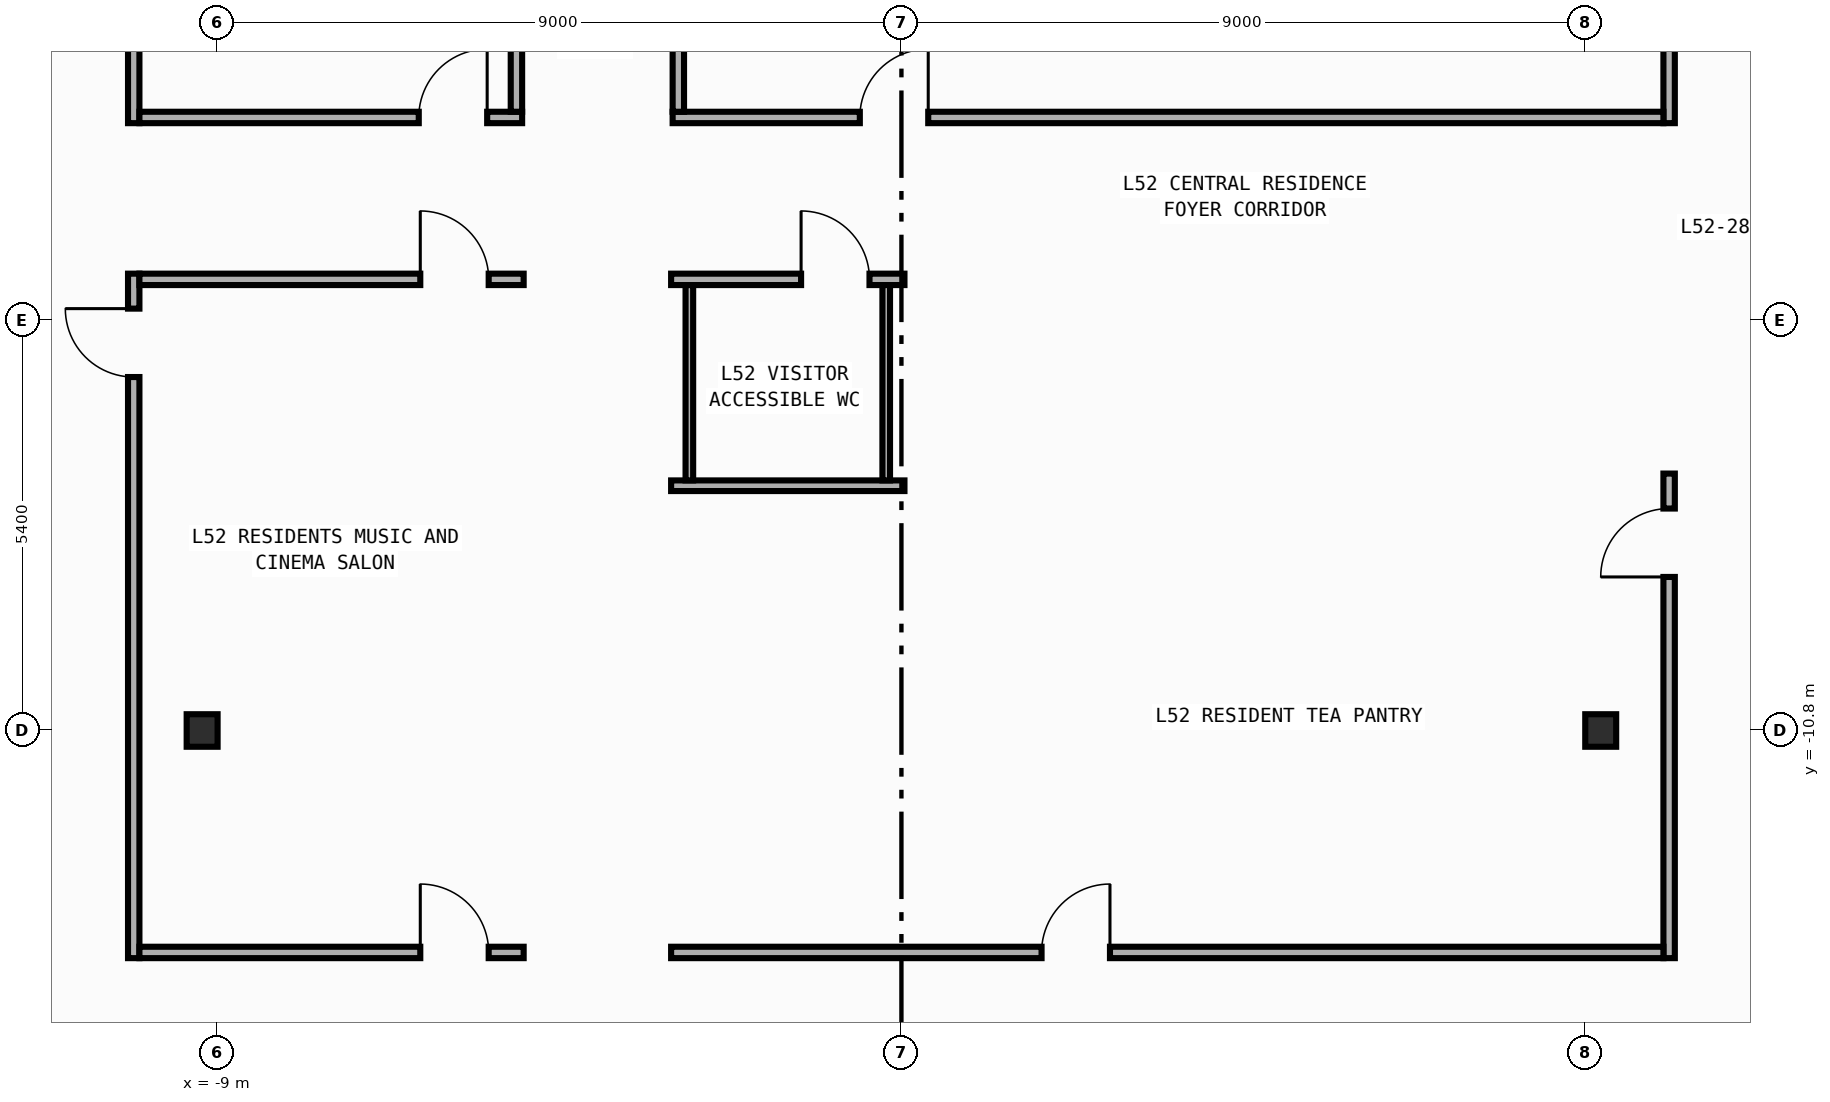
"""IFC4 building model, lengths in metres.
Left out: names, types, materials, properties, quantities, classifications, styles, units other than length and angle.
Written with IfcOpenShell. Run it as: python <this file> out.ifc"""

import sys

from ifc_helpers import new_model, si_unit, direction, frame, frame_2d, origin, origin_2d, place, context, subcontext, project, spatial, rectangle, i_section, extrude, element, fill, save


model = new_model("IFC4")
c1 = context("Model", 3, precision=1e-05, world=origin(), true_north=direction((0.0, 1.0)))
c2 = subcontext(c1, "Body", "Model", "MODEL_VIEW")
j1 = project(units=[si_unit("LENGTHUNIT", "METRE"), si_unit("PLANEANGLEUNIT", "RADIAN")], contexts=[c1])
p1 = place(None, origin())
s1 = spatial("IfcSite", under=j1, at=p1, CompositionType="ELEMENT")
p2 = place(p1, origin())
s2 = spatial("IfcBuilding", under=s1, at=p2, CompositionType="ELEMENT")
p3 = place(p2, frame((0.0, 0.0, 226.0)))
s3 = spatial("IfcBuildingStorey", under=s2, at=p3, CompositionType="ELEMENT", Elevation=226.0)
for number, where, z_axis, x_axis in (
    (1, (-9.2, -10.8, 0.0), (0.0, 0.0, 1.0), (1.0, 0.0, 0.0)),
    (2, (9.2, -10.8, 0.0), (0.0, 0.0, 1.0), (1.0, 0.0, 0.0)),
):
    element("IfcColumn", number, at=place(p3, frame(where, z_axis=z_axis, x_axis=x_axis)), inside=s3, PredefinedType="COLUMN", context=c2, shape_type="SweptSolid", body=[
        extrude(i_section(OverallWidth=0.407, OverallDepth=0.428, WebThickness=0.02, FlangeThickness=0.035, FilletRadius=0.022, at=origin_2d()), origin(), (0.0, 0.0, 1.0), 3.6),
    ])
p4 = place(p3, frame((-10.1, -2.81, 0.0), z_axis=(0.0, 0.0, 1.0), x_axis=(0.0, 1.0, 0.0)))
e3 = element("IfcWall", 3, at=p4, inside=s3, PredefinedType="PARTITIONING", context=c2, shape_type="SweptSolid", body=[
    extrude(rectangle(XDim=16.605, YDim=0.15, at=frame_2d((8.302, 0.0))), origin(), (0.0, 0.0, 1.0), 3.34),
])
p5 = place(p4, frame((7.751, 0.0, 0.0)))
e4 = element("IfcOpeningElement", 4, at=p5, cuts=e3, PredefinedType="OPENING", context=c2, shape_type="SweptSolid", body=[
    extrude(rectangle(XDim=0.9, YDim=2.15, at=frame_2d((0.45, 1.075))), frame((0.0, 0.085, 0.0), z_axis=(0.0, -1.0, 0.0), x_axis=(1.0, 0.0, 0.0)), (0.0, 0.0, 1.0), 0.17),
])
p6 = place(p3, frame((-10.1, -13.795, 0.0), z_axis=(0.0, 0.0, 1.0), x_axis=(0.0, 1.0, 0.0)))
e5 = element("IfcWall", 5, at=p6, inside=s3, PredefinedType="PARTITIONING", context=c2, shape_type="SweptSolid", body=[
    extrude(rectangle(XDim=9.005, YDim=0.15, at=frame_2d((4.502, 0.0))), origin(), (0.0, 0.0, 1.0), 3.34),
])
p7 = place(p6, frame((7.645, 0.0, 0.0)))
e6 = element("IfcOpeningElement", 6, at=p7, cuts=e5, PredefinedType="OPENING", context=c2, shape_type="SweptSolid", body=[
    extrude(rectangle(XDim=0.9, YDim=2.15, at=frame_2d((0.45, 1.075))), frame((0.0, 0.085, 0.0), z_axis=(0.0, -1.0, 0.0), x_axis=(1.0, 0.0, 0.0)), (0.0, 0.0, 1.0), 0.17),
])
p8 = place(p3, frame((10.1, -2.81, 0.0), z_axis=(0.0, 0.0, 1.0), x_axis=(0.0, 1.0, 0.0)))
e7 = element("IfcWall", 7, at=p8, inside=s3, PredefinedType="PARTITIONING", context=c2, shape_type="SweptSolid", body=[
    extrude(rectangle(XDim=16.605, YDim=0.15, at=frame_2d((8.302, 0.0))), origin(), (0.0, 0.0, 1.0), 3.34),
])
p9 = place(p8, frame((7.751, 0.0, 0.0)))
e8 = element("IfcOpeningElement", 8, at=p9, cuts=e7, PredefinedType="OPENING", context=c2, shape_type="SweptSolid", body=[
    extrude(rectangle(XDim=0.9, YDim=2.15, at=frame_2d((0.45, 1.075))), frame((0.0, 0.085, 0.0), z_axis=(0.0, -1.0, 0.0), x_axis=(1.0, 0.0, 0.0)), (0.0, 0.0, 1.0), 0.17),
])
p10 = place(p3, frame((10.1, -13.795, 0.0), z_axis=(0.0, 0.0, 1.0), x_axis=(0.0, 1.0, 0.0)))
e9 = element("IfcWall", 9, at=p10, inside=s3, PredefinedType="PARTITIONING", context=c2, shape_type="SweptSolid", body=[
    extrude(rectangle(XDim=6.375, YDim=0.15, at=frame_2d((3.188, 0.0))), origin(), (0.0, 0.0, 1.0), 3.34),
])
p11 = place(p10, frame((5.015, 0.0, 0.0)))
e10 = element("IfcOpeningElement", 10, at=p11, cuts=e9, PredefinedType="OPENING", context=c2, shape_type="SweptSolid", body=[
    extrude(rectangle(XDim=0.9, YDim=2.15, at=frame_2d((0.45, 1.075))), frame((0.0, 0.085, 0.0), z_axis=(0.0, -1.0, 0.0), x_axis=(1.0, 0.0, 0.0)), (0.0, 0.0, 1.0), 0.17),
])
p12 = place(p3, frame((-10.025, -2.735, 0.0), z_axis=(0.0, 0.0, 1.0), x_axis=(1.0, 0.0, 0.0)))
e11 = element("IfcWall", 11, at=p12, inside=s3, PredefinedType="PARTITIONING", context=c2, shape_type="SweptSolid", body=[
    extrude(rectangle(XDim=5.035, YDim=0.15, at=frame_2d((2.518, 0.0))), origin(), (0.0, 0.0, 1.0), 3.34),
])
p13 = place(p12, frame((3.675, 0.0, 0.0)))
e12 = element("IfcOpeningElement", 12, at=p13, cuts=e11, PredefinedType="OPENING", context=c2, shape_type="SweptSolid", body=[
    extrude(rectangle(XDim=0.9, YDim=2.15, at=frame_2d((0.45, 1.075))), frame((0.0, 0.085, 0.0), z_axis=(0.0, -1.0, 0.0), x_axis=(1.0, 0.0, 0.0)), (0.0, 0.0, 1.0), 0.17),
])
p14 = place(p3, frame((-10.025, -4.865, 0.0), z_axis=(0.0, 0.0, 1.0), x_axis=(1.0, 0.0, 0.0)))
e13 = element("IfcWall", 13, at=p14, inside=s3, PredefinedType="PARTITIONING", context=c2, shape_type="SweptSolid", body=[
    extrude(rectangle(XDim=5.055, YDim=0.15, at=frame_2d((2.527, 0.0))), origin(), (0.0, 0.0, 1.0), 3.34),
])
p15 = place(p14, frame((3.695, 0.0, 0.0)))
e14 = element("IfcOpeningElement", 14, at=p15, cuts=e13, PredefinedType="OPENING", context=c2, shape_type="SweptSolid", body=[
    extrude(rectangle(XDim=0.9, YDim=2.15, at=frame_2d((0.45, 1.075))), frame((0.0, 0.085, 0.0), z_axis=(0.0, -1.0, 0.0), x_axis=(1.0, 0.0, 0.0)), (0.0, 0.0, 1.0), 0.17),
])
p16 = place(p3, frame((-3.01, -2.735, 0.0), z_axis=(0.0, 0.0, 1.0), x_axis=(1.0, 0.0, 0.0)))
e15 = element("IfcWall", 15, at=p16, inside=s3, PredefinedType="PARTITIONING", context=c2, shape_type="SweptSolid", body=[
    extrude(rectangle(XDim=13.035, YDim=0.15, at=frame_2d((6.518, 0.0))), origin(), (0.0, 0.0, 1.0), 3.34),
])
p17 = place(p16, frame((2.463, 0.0, 0.0)))
e16 = element("IfcOpeningElement", 16, at=p17, cuts=e15, PredefinedType="OPENING", context=c2, shape_type="SweptSolid", body=[
    extrude(rectangle(XDim=0.9, YDim=2.15, at=frame_2d((0.45, 1.075))), frame((0.0, 0.085, 0.0), z_axis=(0.0, -1.0, 0.0), x_axis=(1.0, 0.0, 0.0)), (0.0, 0.0, 1.0), 0.17),
])
p18 = place(p3, frame((-3.03, -4.865, 0.0), z_axis=(0.0, 0.0, 1.0), x_axis=(1.0, 0.0, 0.0)))
e17 = element("IfcWall", 17, at=p18, inside=s3, PredefinedType="PARTITIONING", context=c2, shape_type="SweptSolid", body=[
    extrude(rectangle(XDim=3.07, YDim=0.15, at=frame_2d((1.535, 0.0))), origin(), (0.0, 0.0, 1.0), 3.34),
])
p19 = place(p18, frame((1.71, 0.0, 0.0)))
e18 = element("IfcOpeningElement", 18, at=p19, cuts=e17, PredefinedType="OPENING", context=c2, shape_type="SweptSolid", body=[
    extrude(rectangle(XDim=0.9, YDim=2.15, at=frame_2d((0.45, 1.075))), frame((0.0, 0.085, 0.0), z_axis=(0.0, -1.0, 0.0), x_axis=(1.0, 0.0, 0.0)), (0.0, 0.0, 1.0), 0.17),
])
p20 = place(p3, frame((-5.065, -2.66, 0.0), z_axis=(0.0, 0.0, 1.0), x_axis=(0.0, 1.0, 0.0)))
e19 = element("IfcWall", 19, at=p20, inside=s3, PredefinedType="PARTITIONING", context=c2, shape_type="SweptSolid", body=[
    extrude(rectangle(XDim=16.455, YDim=0.15, at=frame_2d((8.228, 0.0))), origin(), (0.0, 0.0, 1.0), 2.99),
])
p21 = place(p20, frame((7.677, 0.0, 0.0)))
e20 = element("IfcOpeningElement", 20, at=p21, cuts=e19, PredefinedType="OPENING", context=c2, shape_type="SweptSolid", body=[
    extrude(rectangle(XDim=0.9, YDim=2.15, at=frame_2d((0.45, 1.075))), frame((0.0, 0.085, 0.0), z_axis=(0.0, -1.0, 0.0), x_axis=(1.0, 0.0, 0.0)), (0.0, 0.0, 1.0), 0.17),
])
p22 = place(p3, frame((-2.935, -2.66, 0.0), z_axis=(0.0, 0.0, 1.0), x_axis=(0.0, 1.0, 0.0)))
e21 = element("IfcWall", 21, at=p22, inside=s3, PredefinedType="PARTITIONING", context=c2, shape_type="SweptSolid", body=[
    extrude(rectangle(XDim=16.455, YDim=0.15, at=frame_2d((8.228, 0.0))), origin(), (0.0, 0.0, 1.0), 3.34),
])
p23 = place(p22, frame((7.677, 0.0, 0.0)))
e22 = element("IfcOpeningElement", 22, at=p23, cuts=e21, PredefinedType="OPENING", context=c2, shape_type="SweptSolid", body=[
    extrude(rectangle(XDim=0.9, YDim=2.15, at=frame_2d((0.45, 1.075))), frame((0.0, 0.085, 0.0), z_axis=(0.0, -1.0, 0.0), x_axis=(1.0, 0.0, 0.0)), (0.0, 0.0, 1.0), 0.17),
])
p24 = place(p3, frame((-10.025, -13.72, 0.0), z_axis=(0.0, 0.0, 1.0), x_axis=(1.0, 0.0, 0.0)))
e23 = element("IfcWall", 23, at=p24, inside=s3, PredefinedType="PARTITIONING", context=c2, shape_type="SweptSolid", body=[
    extrude(rectangle(XDim=5.055, YDim=0.15, at=frame_2d((2.527, 0.0))), origin(), (0.0, 0.0, 1.0), 3.34),
])
p25 = place(p24, frame((3.695, 0.0, 0.0)))
e24 = element("IfcOpeningElement", 24, at=p25, cuts=e23, PredefinedType="OPENING", context=c2, shape_type="SweptSolid", body=[
    extrude(rectangle(XDim=0.9, YDim=2.15, at=frame_2d((0.45, 1.075))), frame((0.0, 0.085, 0.0), z_axis=(0.0, -1.0, 0.0), x_axis=(1.0, 0.0, 0.0)), (0.0, 0.0, 1.0), 0.17),
])
p26 = place(p3, frame((-3.03, -13.72, 0.0), z_axis=(0.0, 0.0, 1.0), x_axis=(1.0, 0.0, 0.0)))
e25 = element("IfcWall", 25, at=p26, inside=s3, PredefinedType="PARTITIONING", context=c2, shape_type="SweptSolid", body=[
    extrude(rectangle(XDim=13.055, YDim=0.15, at=frame_2d((6.527, 0.0))), origin(), (0.0, 0.0, 1.0), 3.34),
])
p27 = place(p26, frame((4.874, 0.0, 0.0)))
e26 = element("IfcOpeningElement", 26, at=p27, cuts=e25, PredefinedType="OPENING", context=c2, shape_type="SweptSolid", body=[
    extrude(rectangle(XDim=0.9, YDim=2.15, at=frame_2d((0.45, 1.075))), frame((0.0, 0.085, 0.0), z_axis=(0.0, -1.0, 0.0), x_axis=(1.0, 0.0, 0.0)), (0.0, 0.0, 1.0), 0.17),
])
p28 = place(p3, frame((-3.03, -7.58, 0.0), z_axis=(0.0, 0.0, 1.0), x_axis=(1.0, 0.0, 0.0)))
e27 = element("IfcWall", 27, at=p28, inside=s3, PredefinedType="PARTITIONING", context=c2, shape_type="SweptSolid", body=[
    extrude(rectangle(XDim=3.07, YDim=0.14, at=frame_2d((1.535, 0.0))), origin(), (0.0, 0.0, 1.0), 3.34),
])
for number, where, z_axis, x_axis in (
    (28, (-0.2, -4.94, 0.0), (0.0, 0.0, 1.0), (0.0, -1.0, 0.0)),
    (29, (-2.79, -7.51, 0.0), (0.0, 0.0, 1.0), (0.0, 1.0, 0.0)),
):
    element("IfcWall", number, at=place(p3, frame(where, z_axis=z_axis, x_axis=x_axis)), inside=s3, PredefinedType="PARTITIONING", context=c2, shape_type="SweptSolid", body=[
        extrude(rectangle(XDim=2.57, YDim=0.1, at=frame_2d((1.285, 0.0))), origin(), (0.0, 0.0, 1.0), 3.34),
    ])
p29 = place(p7, origin())
e30 = element("IfcDoor", 30, at=p29, inside=s3, OperationType="SINGLE_SWING_RIGHT", PredefinedType="DOOR", context=c2, shape_type="SweptSolid", body=[
    extrude(rectangle(XDim=0.9, YDim=2.15, at=frame_2d((0.45, 1.075))), frame((0.0, 0.025, 0.0), z_axis=(0.0, -1.0, 0.0), x_axis=(1.0, 0.0, 0.0)), (0.0, 0.0, 1.0), 0.05),
])
fill(e6, e30)
p30 = place(p11, origin())
e31 = element("IfcDoor", 31, at=p30, inside=s3, OperationType="SINGLE_SWING_LEFT", PredefinedType="DOOR", context=c2, shape_type="SweptSolid", body=[
    extrude(rectangle(XDim=0.9, YDim=2.15, at=frame_2d((0.45, 1.075))), frame((0.0, 0.025, 0.0), z_axis=(0.0, -1.0, 0.0), x_axis=(1.0, 0.0, 0.0)), (0.0, 0.0, 1.0), 0.05),
])
fill(e10, e31)
p31 = place(p13, origin())
e32 = element("IfcDoor", 32, at=p31, inside=s3, OperationType="SINGLE_SWING_RIGHT", PredefinedType="DOOR", context=c2, shape_type="SweptSolid", body=[
    extrude(rectangle(XDim=0.9, YDim=2.15, at=frame_2d((0.45, 1.075))), frame((0.0, 0.025, 0.0), z_axis=(0.0, -1.0, 0.0), x_axis=(1.0, 0.0, 0.0)), (0.0, 0.0, 1.0), 0.05),
])
fill(e12, e32)
p32 = place(p15, origin())
e33 = element("IfcDoor", 33, at=p32, inside=s3, OperationType="SINGLE_SWING_LEFT", PredefinedType="DOOR", context=c2, shape_type="SweptSolid", body=[
    extrude(rectangle(XDim=0.9, YDim=2.15, at=frame_2d((0.45, 1.075))), frame((0.0, 0.025, 0.0), z_axis=(0.0, -1.0, 0.0), x_axis=(1.0, 0.0, 0.0)), (0.0, 0.0, 1.0), 0.05),
])
fill(e14, e33)
p33 = place(p17, origin())
e34 = element("IfcDoor", 34, at=p33, inside=s3, OperationType="SINGLE_SWING_RIGHT", PredefinedType="DOOR", context=c2, shape_type="SweptSolid", body=[
    extrude(rectangle(XDim=0.9, YDim=2.15, at=frame_2d((0.45, 1.075))), frame((0.0, 0.025, 0.0), z_axis=(0.0, -1.0, 0.0), x_axis=(1.0, 0.0, 0.0)), (0.0, 0.0, 1.0), 0.05),
])
fill(e16, e34)
p34 = place(p19, origin())
e35 = element("IfcDoor", 35, at=p34, inside=s3, OperationType="SINGLE_SWING_LEFT", PredefinedType="DOOR", context=c2, shape_type="SweptSolid", body=[
    extrude(rectangle(XDim=0.9, YDim=2.15, at=frame_2d((0.45, 1.075))), frame((0.0, 0.025, 0.0), z_axis=(0.0, -1.0, 0.0), x_axis=(1.0, 0.0, 0.0)), (0.0, 0.0, 1.0), 0.05),
])
fill(e18, e35)
p35 = place(p25, origin())
e36 = element("IfcDoor", 36, at=p35, inside=s3, OperationType="SINGLE_SWING_LEFT", PredefinedType="DOOR", context=c2, shape_type="SweptSolid", body=[
    extrude(rectangle(XDim=0.9, YDim=2.15, at=frame_2d((0.45, 1.075))), frame((0.0, 0.025, 0.0), z_axis=(0.0, -1.0, 0.0), x_axis=(1.0, 0.0, 0.0)), (0.0, 0.0, 1.0), 0.05),
])
fill(e24, e36)
p36 = place(p27, origin())
e37 = element("IfcDoor", 37, at=p36, inside=s3, OperationType="SINGLE_SWING_RIGHT", PredefinedType="DOOR", context=c2, shape_type="SweptSolid", body=[
    extrude(rectangle(XDim=0.9, YDim=2.15, at=frame_2d((0.45, 1.075))), frame((0.0, 0.025, 0.0), z_axis=(0.0, -1.0, 0.0), x_axis=(1.0, 0.0, 0.0)), (0.0, 0.0, 1.0), 0.05),
])
fill(e26, e37)
save(model, sys.argv[1])
